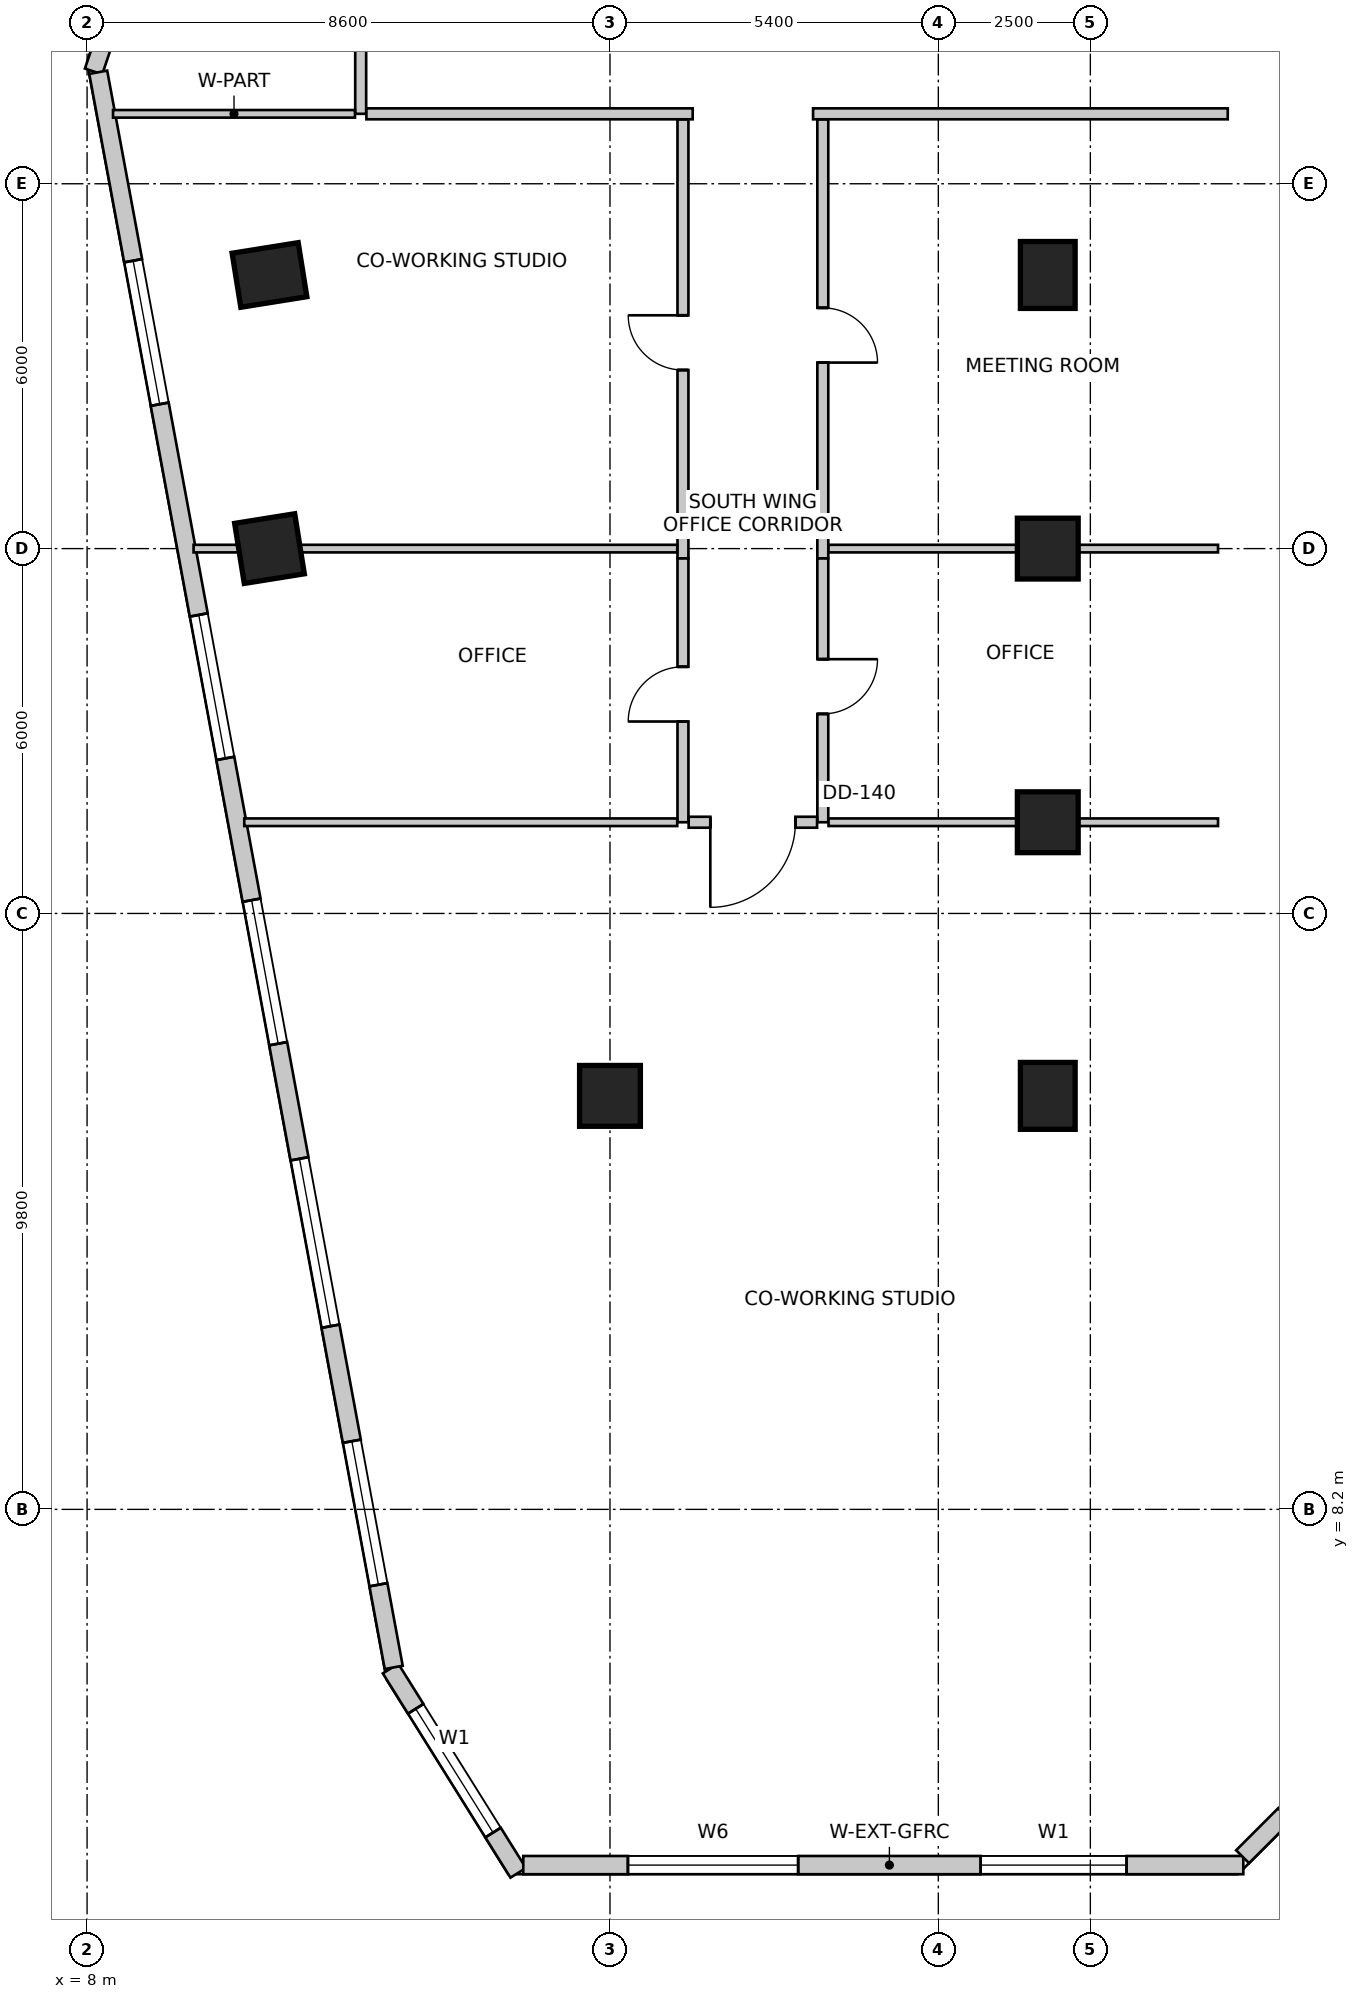
"""IFC4 building model, lengths in metres.
Left out: names, types, materials, properties, quantities, classifications, styles, units other than length and angle.
Written with IfcOpenShell. Run it as: python <this file> out.ifc"""

import sys

from ifc_helpers import new_model, si_unit, direction, frame, frame_2d, origin, origin_2d, place, context, subcontext, project, spatial, rectangle, extrude, source, transform, mapped, element, fill, save


model = new_model("IFC4")
c1 = context("Model", 3, precision=1e-05, world=origin(), true_north=direction((0.0, 1.0)))
c2 = subcontext(c1, "Body", "Model", "MODEL_VIEW")
j1 = project(units=[si_unit("LENGTHUNIT", "METRE"), si_unit("PLANEANGLEUNIT", "RADIAN")], contexts=[c1])
p1 = place(None, origin())
s1 = spatial("IfcSite", under=j1, at=p1, CompositionType="ELEMENT")
p2 = place(p1, origin())
s2 = spatial("IfcBuilding", under=s1, at=p2, CompositionType="ELEMENT")
p3 = place(p2, frame((0.0, 0.0, 91.0)))
s3 = spatial("IfcBuildingStorey", under=s2, at=p3, CompositionType="ELEMENT", Elevation=91.0)
m1 = source(origin(), c2, "Body", "SweptSolid", [
    extrude(rectangle(XDim=0.9, YDim=1.1, at=origin_2d()), origin(), (0.0, 0.0, 1.0), 4.0),
])
p4 = place(p3, frame((11.0, 28.5, 0.0), z_axis=(0.0, 0.0, 1.0), x_axis=(0.158158067254, -0.987413806751, 0.0)))
e1 = element("IfcColumn", 1, at=p4, inside=s3, PredefinedType="COLUMN", context=c2, shape_type="MappedRepresentation", body=[
    mapped(m1, transform((0.0, 0.0, 0.0), scale=1.0)),
])
m2 = source(origin(), c2, "Body", "SweptSolid", [
    extrude(rectangle(XDim=1.0, YDim=1.0, at=origin_2d()), origin(), (0.0, 0.0, 1.0), 4.0),
])
p5 = place(p3, frame((11.0, 24.0, 0.0), z_axis=(0.0, 0.0, 1.0), x_axis=(0.158158067254, -0.987413806751, 0.0)))
e2 = element("IfcColumn", 2, at=p5, inside=s3, PredefinedType="COLUMN", context=c2, shape_type="MappedRepresentation", body=[
    mapped(m2, transform((0.0, 0.0, 0.0), scale=1.0)),
])
p6 = place(p3, frame((23.8, 28.5, 0.0), z_axis=(0.0, 0.0, 1.0), x_axis=(1.0, 0.0, 0.0)))
e3 = element("IfcColumn", 3, at=p6, inside=s3, PredefinedType="COLUMN", context=c2, shape_type="MappedRepresentation", body=[
    mapped(m1, transform((0.0, 0.0, 0.0), scale=1.0)),
])
for number, where, z_axis, x_axis in (
    (4, (23.8, 24.0, 0.0), (0.0, 0.0, 1.0), (1.0, 0.0, 0.0)),
    (5, (23.8, 19.5, 0.0), (0.0, 0.0, 1.0), (1.0, 0.0, 0.0)),
):
    element("IfcColumn", number, at=place(p3, frame(where, z_axis=z_axis, x_axis=x_axis)), inside=s3, PredefinedType="COLUMN", context=c2, shape_type="MappedRepresentation", body=[
        mapped(m2, transform((0.0, 0.0, 0.0), scale=1.0)),
    ])
p7 = place(p3, frame((23.8, 15.0, 0.0), z_axis=(0.0, 0.0, 1.0), x_axis=(1.0, 0.0, 0.0)))
e6 = element("IfcColumn", 6, at=p7, inside=s3, PredefinedType="COLUMN", context=c2, shape_type="MappedRepresentation", body=[
    mapped(m1, transform((0.0, 0.0, 0.0), scale=1.0)),
])
p8 = place(p3, frame((16.6, 15.0, 0.0), z_axis=(0.0, 0.0, 1.0), x_axis=(1.0, 0.0, 0.0)))
e7 = element("IfcColumn", 7, at=p8, inside=s3, PredefinedType="COLUMN", context=c2, shape_type="MappedRepresentation", body=[
    mapped(m2, transform((0.0, 0.0, 0.0), scale=1.0)),
])
p9 = place(p3, frame((12.991, 5.583, 0.0), z_axis=(0.0, 0.0, 1.0), x_axis=(0.530015557218, -0.847987918019, 0.0)))
e8 = element("IfcWall", 8, at=p9, inside=s3, PredefinedType="SOLIDWALL", context=c2, shape_type="SweptSolid", body=[
    extrude(rectangle(XDim=3.962, YDim=0.3, at=frame_2d((1.981, 0.0))), origin(), (0.0, 0.0, 1.0), 3.75),
])
m3 = source(origin(), c2, "Body", "SweptSolid", [
    extrude(rectangle(XDim=2.4, YDim=2.2, at=frame_2d((1.2, 1.1))), frame((0.0, 0.16, 0.0), z_axis=(0.0, -1.0, 0.0), x_axis=(1.0, 0.0, 0.0)), (0.0, 0.0, 1.0), 0.32),
])
p10 = place(p9, frame((0.781, 0.0, 0.85)))
e9 = element("IfcOpeningElement", 9, at=p10, cuts=e8, PredefinedType="OPENING", context=c2, shape_type="MappedRepresentation", body=[
    mapped(m3, transform((0.0, 0.0, 0.0), scale=1.0)),
])
p11 = place(p3, frame((15.174, 2.35, 0.0), z_axis=(0.0, 0.0, 1.0), x_axis=(1.0, 0.0, 0.0)))
e10 = element("IfcWall", 10, at=p11, inside=s3, PredefinedType="SOLIDWALL", context=c2, shape_type="SweptSolid", body=[
    extrude(rectangle(XDim=11.842, YDim=0.3, at=frame_2d((5.921, 0.0))), origin(), (0.0, 0.0, 1.0), 3.75),
])
m4 = source(origin(), c2, "Body", "SweptSolid", [
    extrude(rectangle(XDim=2.8, YDim=2.4, at=frame_2d((1.4, 1.2))), frame((0.0, 0.16, 0.0), z_axis=(0.0, -1.0, 0.0), x_axis=(1.0, 0.0, 0.0)), (0.0, 0.0, 1.0), 0.32),
])
p12 = place(p11, frame((1.721, 0.0, 0.85)))
e11 = element("IfcOpeningElement", 11, at=p12, cuts=e10, PredefinedType="OPENING", context=c2, shape_type="MappedRepresentation", body=[
    mapped(m4, transform((0.0, 0.0, 0.0), scale=1.0)),
])
p13 = place(p11, frame((7.522, 0.0, 0.85)))
e12 = element("IfcOpeningElement", 12, at=p13, cuts=e10, PredefinedType="OPENING", context=c2, shape_type="MappedRepresentation", body=[
    mapped(m3, transform((0.0, 0.0, 0.0), scale=1.0)),
])
p14 = place(p3, frame((27.004, 2.488, 0.0), z_axis=(0.0, 0.0, 1.0), x_axis=(0.707106781187, 0.707106781187, 0.0)))
e13 = element("IfcWall", 13, at=p14, inside=s3, PredefinedType="SOLIDWALL", context=c2, shape_type="SweptSolid", body=[
    extrude(rectangle(XDim=4.356, YDim=0.3, at=frame_2d((2.178, 0.0))), origin(), (0.0, 0.0, 1.0), 3.75),
])
p15 = place(p14, frame((0.978, 0.0, 0.85)))
e14 = element("IfcOpeningElement", 14, at=p15, cuts=e13, PredefinedType="OPENING", context=c2, shape_type="MappedRepresentation", body=[
    mapped(m3, transform((0.0, 0.0, 0.0), scale=1.0)),
])
p16 = place(p3, frame((13.269, 47.134, 0.0), z_axis=(0.0, 0.0, 1.0), x_axis=(-0.319920423265, -0.947444416722, 0.0)))
e15 = element("IfcWall", 15, at=p16, inside=s3, PredefinedType="SOLIDWALL", context=c2, shape_type="SweptSolid", body=[
    extrude(rectangle(XDim=16.135, YDim=0.3, at=frame_2d((8.067, 0.0))), origin(), (0.0, 0.0, 1.0), 3.75),
])
p17 = place(p16, frame((1.988, 0.0, 0.85)))
e16 = element("IfcOpeningElement", 16, at=p17, cuts=e15, PredefinedType="OPENING", context=c2, shape_type="MappedRepresentation", body=[
    mapped(m4, transform((0.0, 0.0, 0.0), scale=1.0)),
])
p18 = place(p16, frame((7.159, 0.0, 0.85)))
e17 = element("IfcOpeningElement", 17, at=p18, cuts=e15, PredefinedType="OPENING", context=c2, shape_type="MappedRepresentation", body=[
    mapped(m3, transform((0.0, 0.0, 0.0), scale=1.0)),
])
p19 = place(p16, frame((11.93, 0.0, 0.85)))
e18 = element("IfcOpeningElement", 18, at=p19, cuts=e15, PredefinedType="OPENING", context=c2, shape_type="MappedRepresentation", body=[
    mapped(m4, transform((0.0, 0.0, 0.0), scale=1.0)),
])
p20 = place(p3, frame((8.183, 31.833, 0.0), z_axis=(0.0, 0.0, 1.0), x_axis=(0.18216364648, -0.983268226834, 0.0)))
e19 = element("IfcWall", 19, at=p20, inside=s3, PredefinedType="SOLIDWALL", context=c2, shape_type="SweptSolid", body=[
    extrude(rectangle(XDim=26.678, YDim=0.3, at=frame_2d((13.339, 0.0))), origin(), (0.0, 0.0, 1.0), 3.75),
])
p21 = place(p20, frame((3.152, 0.0, 0.85)))
e20 = element("IfcOpeningElement", 20, at=p21, cuts=e19, PredefinedType="OPENING", context=c2, shape_type="MappedRepresentation", body=[
    mapped(m3, transform((0.0, 0.0, 0.0), scale=1.0)),
])
p22 = place(p20, frame((9.076, 0.0, 0.85)))
e21 = element("IfcOpeningElement", 21, at=p22, cuts=e19, PredefinedType="OPENING", context=c2, shape_type="MappedRepresentation", body=[
    mapped(m3, transform((0.0, 0.0, 0.0), scale=1.0)),
])
p23 = place(p20, frame((13.847, 0.0, 0.85)))
e22 = element("IfcOpeningElement", 22, at=p23, cuts=e19, PredefinedType="OPENING", context=c2, shape_type="MappedRepresentation", body=[
    mapped(m3, transform((0.0, 0.0, 0.0), scale=1.0)),
])
p24 = place(p20, frame((18.172, 0.0, 0.85)))
e23 = element("IfcOpeningElement", 23, at=p24, cuts=e19, PredefinedType="OPENING", context=c2, shape_type="MappedRepresentation", body=[
    mapped(m4, transform((0.0, 0.0, 0.0), scale=1.0)),
])
p25 = place(p20, frame((22.896, 0.0, 0.85)))
e24 = element("IfcOpeningElement", 24, at=p25, cuts=e19, PredefinedType="OPENING", context=c2, shape_type="MappedRepresentation", body=[
    mapped(m3, transform((0.0, 0.0, 0.0), scale=1.0)),
])
p26 = place(p3, frame((12.5, 31.15, 0.0), z_axis=(0.0, 0.0, 1.0), x_axis=(0.0, 1.0, 0.0)))
e25 = element("IfcWall", 25, at=p26, inside=s3, PredefinedType="PARTITIONING", context=c2, shape_type="SweptSolid", body=[
    extrude(rectangle(XDim=2.2, YDim=0.18, at=frame_2d((1.1, 0.0))), origin(), (0.0, 0.0, 1.0), 3.419),
])
p27 = place(p3, frame((17.96, 31.15, 0.0), z_axis=(0.0, 0.0, 1.0), x_axis=(-1.0, 0.0, 0.0)))
e26 = element("IfcWall", 26, at=p27, inside=s3, PredefinedType="PARTITIONING", context=c2, shape_type="SweptSolid", body=[
    extrude(rectangle(XDim=5.366, YDim=0.18, at=frame_2d((2.683, 0.0))), origin(), (0.0, 0.0, 1.0), 3.419),
])
p28 = place(p3, frame((26.76, 31.15, 0.0), z_axis=(0.0, 0.0, 1.0), x_axis=(-1.0, 0.0, 0.0)))
e27 = element("IfcWall", 27, at=p28, inside=s3, PredefinedType="PARTITIONING", context=c2, shape_type="SweptSolid", body=[
    extrude(rectangle(XDim=6.82, YDim=0.18, at=frame_2d((3.41, 0.0))), origin(), (0.0, 0.0, 1.0), 3.419),
])
p29 = place(p3, frame((12.406, 31.15, 0.0), z_axis=(0.0, 0.0, 1.0), x_axis=(-1.0, 0.0, 0.0)))
e28 = element("IfcWall", 28, at=p29, inside=s3, PredefinedType="PARTITIONING", context=c2, shape_type="SweptSolid", body=[
    extrude(rectangle(XDim=3.979, YDim=0.125, at=frame_2d((1.99, 0.0))), origin(), (0.0, 0.0, 1.0), 2.892),
])
p30 = place(p3, frame((17.8, 23.84, 0.0), z_axis=(0.0, 0.0, 1.0), x_axis=(0.0, 1.0, 0.0)))
e29 = element("IfcWall", 29, at=p30, inside=s3, PredefinedType="PARTITIONING", context=c2, shape_type="SweptSolid", body=[
    extrude(rectangle(XDim=7.216, YDim=0.18, at=frame_2d((3.608, 0.0))), origin(), (0.0, 0.0, 1.0), 3.125),
])
m5 = source(origin(), c2, "Body", "SweptSolid", [
    extrude(rectangle(XDim=0.9, YDim=2.15, at=frame_2d((0.45, 1.075))), frame((0.0, 0.1, 0.0), z_axis=(0.0, -1.0, 0.0), x_axis=(1.0, 0.0, 0.0)), (0.0, 0.0, 1.0), 0.2),
])
p31 = place(p30, frame((3.097, 0.0, 0.0)))
e30 = element("IfcOpeningElement", 30, at=p31, cuts=e29, PredefinedType="OPENING", context=c2, shape_type="MappedRepresentation", body=[
    mapped(m5, transform((0.0, 0.0, 0.0), scale=1.0)),
])
p32 = place(p3, frame((17.8, 19.5, 0.0), z_axis=(0.0, 0.0, 1.0), x_axis=(0.0, 1.0, 0.0)))
e31 = element("IfcWall", 31, at=p32, inside=s3, PredefinedType="PARTITIONING", context=c2, shape_type="SweptSolid", body=[
    extrude(rectangle(XDim=4.338, YDim=0.18, at=frame_2d((2.169, 0.0))), origin(), (0.0, 0.0, 1.0), 3.279),
])
p33 = place(p32, frame((1.656, 0.0, 0.0)))
e32 = element("IfcOpeningElement", 32, at=p33, cuts=e31, PredefinedType="OPENING", context=c2, shape_type="MappedRepresentation", body=[
    mapped(m5, transform((0.0, 0.0, 0.0), scale=1.0)),
])
p34 = place(p3, frame((20.1, 31.056, 0.0), z_axis=(0.0, 0.0, 1.0), x_axis=(0.0, -1.0, 0.0)))
e33 = element("IfcWall", 33, at=p34, inside=s3, PredefinedType="PARTITIONING", context=c2, shape_type="SweptSolid", body=[
    extrude(rectangle(XDim=7.216, YDim=0.18, at=frame_2d((3.608, 0.0))), origin(), (0.0, 0.0, 1.0), 3.125),
])
p35 = place(p34, frame((3.097, 0.0, 0.0)))
e34 = element("IfcOpeningElement", 34, at=p35, cuts=e33, PredefinedType="OPENING", context=c2, shape_type="MappedRepresentation", body=[
    mapped(m5, transform((0.0, 0.0, 0.0), scale=1.0)),
])
p36 = place(p3, frame((20.1, 23.838, 0.0), z_axis=(0.0, 0.0, 1.0), x_axis=(0.0, -1.0, 0.0)))
e35 = element("IfcWall", 35, at=p36, inside=s3, PredefinedType="PARTITIONING", context=c2, shape_type="SweptSolid", body=[
    extrude(rectangle(XDim=4.338, YDim=0.18, at=frame_2d((2.169, 0.0))), origin(), (0.0, 0.0, 1.0), 3.279),
])
p37 = place(p36, frame((1.656, 0.0, 0.0)))
e36 = element("IfcOpeningElement", 36, at=p37, cuts=e35, PredefinedType="OPENING", context=c2, shape_type="MappedRepresentation", body=[
    mapped(m5, transform((0.0, 0.0, 0.0), scale=1.0)),
])
p38 = place(p3, frame((20.006, 19.5, 0.0), z_axis=(0.0, 0.0, 1.0), x_axis=(-1.0, 0.0, 0.0)))
e37 = element("IfcWall", 37, at=p38, inside=s3, PredefinedType="PARTITIONING", context=c2, shape_type="SweptSolid", body=[
    extrude(rectangle(XDim=2.112, YDim=0.18, at=frame_2d((1.056, 0.0))), origin(), (0.0, 0.0, 1.0), 3.75),
])
m6 = source(origin(), c2, "Body", "SweptSolid", [
    extrude(rectangle(XDim=1.4, YDim=2.15, at=frame_2d((0.7, 1.075))), frame((0.0, 0.1, 0.0), z_axis=(0.0, -1.0, 0.0), x_axis=(1.0, 0.0, 0.0)), (0.0, 0.0, 1.0), 0.2),
])
p39 = place(p38, frame((0.356, 0.0, 0.0)))
e38 = element("IfcOpeningElement", 38, at=p39, cuts=e37, PredefinedType="OPENING", context=c2, shape_type="MappedRepresentation", body=[
    mapped(m6, transform((0.0, 0.0, 0.0), scale=1.0)),
])
p40 = place(p3, frame((17.706, 24.0, 0.0), z_axis=(0.0, 0.0, 1.0), x_axis=(-1.0, 0.0, 0.0)))
e39 = element("IfcWall", 39, at=p40, inside=s3, PredefinedType="PARTITIONING", context=c2, shape_type="SweptSolid", body=[
    extrude(rectangle(XDim=7.954, YDim=0.125, at=frame_2d((3.977, 0.0))), origin(), (0.0, 0.0, 1.0), 2.892),
])
p41 = place(p3, frame((17.706, 19.5, 0.0), z_axis=(0.0, 0.0, 1.0), x_axis=(-1.0, 0.0, 0.0)))
e40 = element("IfcWall", 40, at=p41, inside=s3, PredefinedType="PARTITIONING", context=c2, shape_type="SweptSolid", body=[
    extrude(rectangle(XDim=7.121, YDim=0.125, at=frame_2d((3.561, 0.0))), origin(), (0.0, 0.0, 1.0), 3.75),
])
for number, where, z_axis, x_axis in (
    (41, (26.6, 24.0, 0.0), (0.0, 0.0, 1.0), (-1.0, 0.0, 0.0)),
    (42, (26.6, 19.5, 0.0), (0.0, 0.0, 1.0), (-1.0, 0.0, 0.0)),
):
    element("IfcWall", number, at=place(p3, frame(where, z_axis=z_axis, x_axis=x_axis)), inside=s3, PredefinedType="PARTITIONING", context=c2, shape_type="SweptSolid", body=[
        extrude(rectangle(XDim=6.406, YDim=0.125, at=frame_2d((3.203, 0.0))), origin(), (0.0, 0.0, 1.0), 2.892),
    ])
m7 = source(origin(), c2, "Body", "SweptSolid", [
    extrude(rectangle(XDim=2.4, YDim=2.2, at=frame_2d((1.2, 1.1))), frame((0.0, -0.015, 0.0), z_axis=(0.0, -1.0, 0.0), x_axis=(1.0, 0.0, 0.0)), (0.0, 0.0, 1.0), 0.06),
])
p42 = place(p10, origin())
e43 = element("IfcWindow", 43, at=p42, inside=s3, PartitioningType="SINGLE_PANEL", PredefinedType="WINDOW", context=c2, shape_type="MappedRepresentation", body=[
    mapped(m7, transform((0.0, 0.0, 0.0), scale=1.0)),
])
fill(e9, e43)
m8 = source(origin(), c2, "Body", "SweptSolid", [
    extrude(rectangle(XDim=2.8, YDim=2.4, at=frame_2d((1.4, 1.2))), frame((0.0, -0.015, 0.0), z_axis=(0.0, -1.0, 0.0), x_axis=(1.0, 0.0, 0.0)), (0.0, 0.0, 1.0), 0.06),
])
p43 = place(p12, origin())
e44 = element("IfcWindow", 44, at=p43, inside=s3, PartitioningType="SINGLE_PANEL", PredefinedType="WINDOW", context=c2, shape_type="MappedRepresentation", body=[
    mapped(m8, transform((0.0, 0.0, 0.0), scale=1.0)),
])
fill(e11, e44)
p44 = place(p13, origin())
e45 = element("IfcWindow", 45, at=p44, inside=s3, PartitioningType="SINGLE_PANEL", PredefinedType="WINDOW", context=c2, shape_type="MappedRepresentation", body=[
    mapped(m7, transform((0.0, 0.0, 0.0), scale=1.0)),
])
fill(e12, e45)
p45 = place(p21, origin())
e46 = element("IfcWindow", 46, at=p45, inside=s3, PartitioningType="SINGLE_PANEL", PredefinedType="WINDOW", context=c2, shape_type="MappedRepresentation", body=[
    mapped(m7, transform((0.0, 0.0, 0.0), scale=1.0)),
])
fill(e20, e46)
p46 = place(p22, origin())
e47 = element("IfcWindow", 47, at=p46, inside=s3, PartitioningType="SINGLE_PANEL", PredefinedType="WINDOW", context=c2, shape_type="MappedRepresentation", body=[
    mapped(m7, transform((0.0, 0.0, 0.0), scale=1.0)),
])
fill(e21, e47)
p47 = place(p23, origin())
e48 = element("IfcWindow", 48, at=p47, inside=s3, PartitioningType="SINGLE_PANEL", PredefinedType="WINDOW", context=c2, shape_type="MappedRepresentation", body=[
    mapped(m7, transform((0.0, 0.0, 0.0), scale=1.0)),
])
fill(e22, e48)
p48 = place(p24, origin())
e49 = element("IfcWindow", 49, at=p48, inside=s3, PartitioningType="SINGLE_PANEL", PredefinedType="WINDOW", context=c2, shape_type="MappedRepresentation", body=[
    mapped(m8, transform((0.0, 0.0, 0.0), scale=1.0)),
])
fill(e23, e49)
p49 = place(p25, origin())
e50 = element("IfcWindow", 50, at=p49, inside=s3, PartitioningType="SINGLE_PANEL", PredefinedType="WINDOW", context=c2, shape_type="MappedRepresentation", body=[
    mapped(m7, transform((0.0, 0.0, 0.0), scale=1.0)),
])
fill(e24, e50)
m9 = source(origin(), c2, "Body", "SweptSolid", [
    extrude(rectangle(XDim=0.9, YDim=2.15, at=frame_2d((0.45, 1.075))), frame((0.0, 0.025, 0.0), z_axis=(0.0, -1.0, 0.0), x_axis=(1.0, 0.0, 0.0)), (0.0, 0.0, 1.0), 0.05),
])
p50 = place(p31, origin())
e51 = element("IfcDoor", 51, at=p50, inside=s3, OperationType="SINGLE_SWING_RIGHT", PredefinedType="DOOR", context=c2, shape_type="MappedRepresentation", body=[
    mapped(m9, transform((0.0, 0.0, 0.0), scale=1.0)),
])
fill(e30, e51)
p51 = place(p33, origin())
e52 = element("IfcDoor", 52, at=p51, inside=s3, OperationType="SINGLE_SWING_LEFT", PredefinedType="DOOR", context=c2, shape_type="MappedRepresentation", body=[
    mapped(m9, transform((0.0, 0.0, 0.0), scale=1.0)),
])
fill(e32, e52)
p52 = place(p35, origin())
e53 = element("IfcDoor", 53, at=p52, inside=s3, OperationType="SINGLE_SWING_RIGHT", PredefinedType="DOOR", context=c2, shape_type="MappedRepresentation", body=[
    mapped(m9, transform((0.0, 0.0, 0.0), scale=1.0)),
])
fill(e34, e53)
p53 = place(p37, origin())
e54 = element("IfcDoor", 54, at=p53, inside=s3, OperationType="SINGLE_SWING_LEFT", PredefinedType="DOOR", context=c2, shape_type="MappedRepresentation", body=[
    mapped(m9, transform((0.0, 0.0, 0.0), scale=1.0)),
])
fill(e36, e54)
m10 = source(origin(), c2, "Body", "SweptSolid", [
    extrude(rectangle(XDim=1.4, YDim=2.15, at=frame_2d((0.7, 1.075))), frame((0.0, 0.025, 0.0), z_axis=(0.0, -1.0, 0.0), x_axis=(1.0, 0.0, 0.0)), (0.0, 0.0, 1.0), 0.05),
])
p54 = place(p39, origin())
e55 = element("IfcDoor", 55, at=p54, inside=s3, OperationType="SINGLE_SWING_RIGHT", PredefinedType="DOOR", context=c2, shape_type="MappedRepresentation", body=[
    mapped(m10, transform((0.0, 0.0, 0.0), scale=1.0)),
])
fill(e38, e55)
save(model, sys.argv[1])
